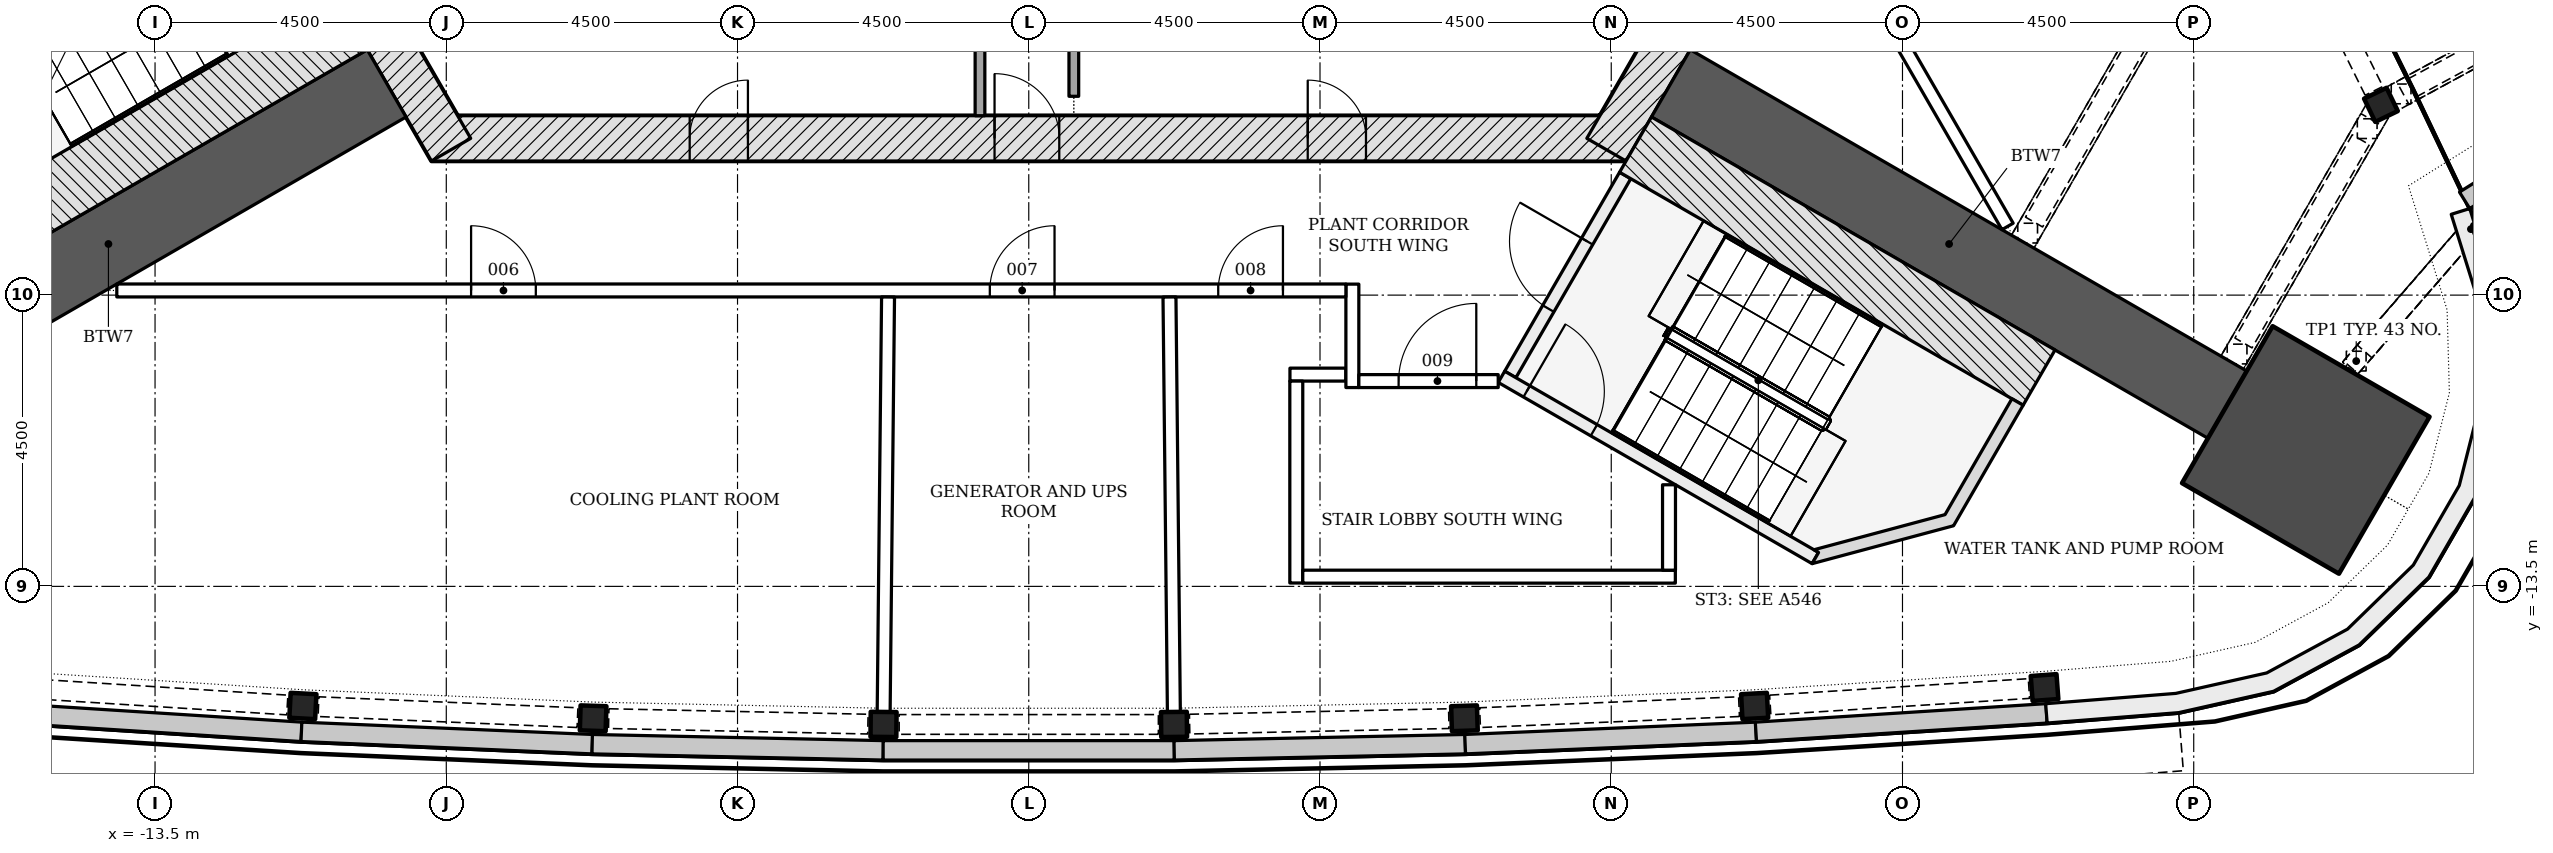
"""IFC4 building model, lengths in metres.
Left out: names, types, materials, properties, quantities, classifications, styles, units other than length and angle.
Written with IfcOpenShell. Run it as: python <this file> out.ifc"""

import sys

from ifc_helpers import new_model, si_unit, direction, frame, frame_2d, origin, origin_2d, place, context, subcontext, project, spatial, polyline, rectangle, i_section, outline, extrude, element, fill, save


model = new_model("IFC4")
c1 = context("Model", 3, precision=1e-05, world=origin(), true_north=direction((0.0, 1.0)))
c2 = subcontext(c1, "Body", "Model", "MODEL_VIEW")
j1 = project(units=[si_unit("LENGTHUNIT", "METRE"), si_unit("PLANEANGLEUNIT", "RADIAN")], contexts=[c1])
p1 = place(None, origin())
s1 = spatial("IfcSite", under=j1, at=p1, CompositionType="ELEMENT")
p2 = place(p1, origin())
s2 = spatial("IfcBuilding", under=s1, at=p2, CompositionType="ELEMENT")
p3 = place(p2, frame((0.0, 0.0, 168.9)))
s3 = spatial("IfcBuildingStorey", under=s2, at=p3, CompositionType="ELEMENT", Elevation=168.9)
p4 = place(p3, frame((-9.229, -6.578, -0.3), z_axis=(0.0, 0.0, 1.0), x_axis=(1.0, 0.0, 0.0)))
e1 = element("IfcWall", 1, at=p4, inside=s3, PredefinedType="SHEAR", context=c2, shape_type="SweptSolid", body=[
    extrude(rectangle(XDim=18.458, YDim=0.7, at=frame_2d((9.229, 0.0))), origin(), (0.0, 0.0, 1.0), 5.5),
])
p5 = place(p4, frame((8.7, 0.0, 0.3)))
e2 = element("IfcOpeningElement", 2, at=p5, cuts=e1, PredefinedType="OPENING", context=c2, shape_type="SweptSolid", body=[
    extrude(rectangle(XDim=1.0, YDim=2.1, at=frame_2d((0.5, 1.05))), frame((0.0, 0.36, 0.0), z_axis=(0.0, -1.0, 0.0), x_axis=(1.0, 0.0, 0.0)), (0.0, 0.0, 1.0), 0.72),
])
p6 = place(p4, frame((3.99, 0.0, 0.3)))
e3 = element("IfcOpeningElement", 3, at=p6, cuts=e1, PredefinedType="OPENING", context=c2, shape_type="SweptSolid", body=[
    extrude(rectangle(XDim=0.9, YDim=2.1, at=frame_2d((0.45, 1.05))), frame((0.0, 0.36, 0.0), z_axis=(0.0, -1.0, 0.0), x_axis=(1.0, 0.0, 0.0)), (0.0, 0.0, 1.0), 0.72),
])
p7 = place(p4, frame((13.539, 0.0, 0.3)))
e4 = element("IfcOpeningElement", 4, at=p7, cuts=e1, PredefinedType="OPENING", context=c2, shape_type="SweptSolid", body=[
    extrude(rectangle(XDim=0.9, YDim=2.1, at=frame_2d((0.45, 1.05))), frame((0.0, 0.36, 0.0), z_axis=(0.0, -1.0, 0.0), x_axis=(1.0, 0.0, 0.0)), (0.0, 0.0, 1.0), 0.72),
])
for number, where, z_axis, x_axis in (
    (5, (8.926, -6.753, -0.3), (0.0, 0.0, 1.0), (0.5, 0.866, 0.0)),
    (6, (-10.311, -4.353, -0.3), (0.0, 0.0, 1.0), (0.5, -0.866, 0.0)),
):
    element("IfcWall", number, at=place(p3, frame(where, z_axis=z_axis, x_axis=x_axis)), inside=s3, PredefinedType="SHEAR", context=c2, shape_type="SweptSolid", body=[
        extrude(rectangle(XDim=2.771, YDim=0.7, at=frame_2d((1.386, 0.0))), origin(), (0.0, 0.0, 1.0), 5.5),
    ])
for number, where, z_axis, x_axis in (
    (7, (-9.922, -5.728, -0.3), (0.0, 0.0, 1.0), (-0.866, -0.5, 0.0)),
    (8, (9.922, -5.728, -0.3), (0.0, 0.0, 1.0), (0.866, -0.5, 0.0)),
):
    element("IfcWall", number, at=place(p3, frame(where, z_axis=z_axis, x_axis=x_axis)), inside=s3, PredefinedType="SHEAR", context=c2, shape_type="SweptSolid", body=[
        extrude(rectangle(XDim=9.927, YDim=1.2, at=frame_2d((4.964, 0.0))), origin(), (0.0, 0.0, 1.0), 5.5),
    ])
p8 = place(p3, frame((19.731, -11.392, -0.3), z_axis=(0.0, 0.0, 1.0), x_axis=(0.866025403784, -0.5, 0.0)))
e9 = element("IfcColumn", 9, at=p8, inside=s3, PredefinedType="COLUMN", context=c2, shape_type="SweptSolid", body=[
    extrude(rectangle(XDim=2.8, YDim=2.8, at=origin_2d()), origin(), (0.0, 0.0, 1.0), 5.5),
])
for number, where, z_axis, x_axis in (
    (10, (-11.216, -15.348, -0.3), (0.0, 0.0, 1.0), (0.999, -0.053, 0.0)),
    (11, (-6.731, -15.538, -0.3), (0.0, 0.0, 1.0), (0.999, -0.032, 0.0)),
    (12, (-2.244, -15.633, -0.3), (0.0, 0.0, 1.0), (1.0, -0.011, 0.0)),
    (13, (2.244, -15.633, -0.3), (0.0, 0.0, 1.0), (1.0, 0.011, 0.0)),
    (14, (6.731, -15.538, -0.3), (0.0, 0.0, 1.0), (0.999, 0.032, 0.0)),
    (15, (11.216, -15.348, -0.3), (0.0, 0.0, 1.0), (0.999, 0.053, 0.0)),
    (16, (15.695, -15.063, -0.3), (0.0, 0.0, 1.0), (0.997, 0.074, 0.0)),
    (17, (20.893, -6.061, -0.3), (0.0, 0.0, 1.0), (-0.434, 0.901, 0.0)),
):
    element("IfcColumn", number, at=place(p3, frame(where, z_axis=z_axis, x_axis=x_axis)), inside=s3, PredefinedType="COLUMN", context=c2, shape_type="SweptSolid", body=[
        extrude(i_section(OverallWidth=0.399, OverallDepth=0.386, WebThickness=0.021, FlangeThickness=0.033, FilletRadius=0.015, at=origin_2d()), origin(), (0.0, 0.0, 1.0), 5.5),
    ])
p9 = place(p3, origin())
e18 = element("IfcWall", 18, at=p9, inside=s3, PredefinedType="NOTDEFINED", context=c2, shape_type="SweptSolid", body=[
    extrude(outline(polyline([(-15.736, -15.612), (-11.245, -15.897), (-11.226, -15.598), (-15.717, -15.312), (-15.736, -15.612)])), origin(), (0.0, 0.0, 1.0), 1.2),
])
p10 = place(p3, origin())
e19 = element("IfcWall", 19, at=p10, inside=s3, PredefinedType="NOTDEFINED", context=c2, shape_type="SweptSolid", body=[
    extrude(outline(polyline([(-11.245, -15.897), (-6.749, -16.088), (-6.736, -15.788), (-11.232, -15.598), (-11.245, -15.897)])), origin(), (0.0, 0.0, 1.0), 1.2),
])
p11 = place(p3, origin())
e20 = element("IfcWall", 20, at=p11, inside=s3, PredefinedType="NOTDEFINED", context=c2, shape_type="SweptSolid", body=[
    extrude(outline(polyline([(-6.749, -16.088), (-2.25, -16.183), (-2.244, -15.883), (-6.742, -15.788), (-6.749, -16.088)])), origin(), (0.0, 0.0, 1.0), 1.2),
])
p12 = place(p3, origin())
e21 = element("IfcWall", 21, at=p12, inside=s3, PredefinedType="NOTDEFINED", context=c2, shape_type="SweptSolid", body=[
    extrude(outline(polyline([(-2.25, -16.183), (2.25, -16.183), (2.25, -15.883), (-2.25, -15.883), (-2.25, -16.183)])), origin(), (0.0, 0.0, 1.0), 1.2),
])
p13 = place(p3, origin())
e22 = element("IfcWall", 22, at=p13, inside=s3, PredefinedType="NOTDEFINED", context=c2, shape_type="SweptSolid", body=[
    extrude(outline(polyline([(2.25, -16.183), (6.749, -16.088), (6.742, -15.788), (2.244, -15.883), (2.25, -16.183)])), origin(), (0.0, 0.0, 1.0), 1.2),
])
p14 = place(p3, origin())
e23 = element("IfcWall", 23, at=p14, inside=s3, PredefinedType="NOTDEFINED", context=c2, shape_type="SweptSolid", body=[
    extrude(outline(polyline([(6.749, -16.088), (11.245, -15.897), (11.232, -15.598), (6.736, -15.788), (6.749, -16.088)])), origin(), (0.0, 0.0, 1.0), 1.2),
])
p15 = place(p3, origin())
e24 = element("IfcWall", 24, at=p15, inside=s3, PredefinedType="NOTDEFINED", context=c2, shape_type="SweptSolid", body=[
    extrude(outline(polyline([(11.245, -15.897), (15.736, -15.612), (15.717, -15.312), (11.226, -15.598), (11.245, -15.897)])), origin(), (0.0, 0.0, 1.0), 1.2),
])
p16 = place(p3, origin())
e25 = element("IfcWall", 25, at=p16, inside=s3, PredefinedType="NOTDEFINED", context=c2, shape_type="SweptSolid", body=[
    extrude(outline(polyline([(22.265, -7.662), (24.846, -6.048), (24.687, -5.794), (22.106, -7.408), (22.265, -7.662)])), origin(), (0.0, 0.0, 1.0), 1.2),
])
p17 = place(p3, origin())
e26 = element("IfcWall", 26, at=p17, inside=s3, PredefinedType="NOTDEFINED", context=c2, shape_type="SweptSolid", body=[
    extrude(outline(polyline([(15.736, -15.612), (17.768, -15.451), (19.234, -15.121), (20.555, -14.405), (21.632, -13.357), (22.383, -12.055), (22.753, -10.599), (22.712, -9.097), (22.265, -7.662), (21.979, -7.751), (22.413, -9.146), (22.452, -10.565), (22.103, -11.941), (21.393, -13.171), (20.376, -14.161), (19.128, -14.837), (17.723, -15.154), (15.712, -15.312), (15.736, -15.612)])), origin(), (0.0, 0.0, 1.0), 5.2),
])
p18 = place(p3, frame((-0.754, 5.272, 0.0), z_axis=(0.0, 0.0, 1.0), x_axis=(0.0, -1.0, 0.0)))
e27 = element("IfcWall", 27, at=p18, inside=s3, PredefinedType="PARTITIONING", context=c2, shape_type="SweptSolid", body=[
    extrude(rectangle(XDim=11.5, YDim=0.15, at=frame_2d((5.75, 0.0))), origin(), (0.0, 0.0, 1.0), 5.2),
])
p19 = place(p18, frame((3.701, 0.0, 0.0)))
e28 = element("IfcOpeningElement", 28, at=p19, cuts=e27, PredefinedType="OPENING", context=c2, shape_type="SweptSolid", body=[
    extrude(rectangle(XDim=0.9, YDim=2.1, at=frame_2d((0.45, 1.05))), frame((0.0, 0.085, 0.0), z_axis=(0.0, -1.0, 0.0), x_axis=(1.0, 0.0, 0.0)), (0.0, 0.0, 1.0), 0.17),
])
p20 = place(p3, frame((0.696, -5.928, 0.0), z_axis=(0.0, 0.0, 1.0), x_axis=(0.0, 1.0, 0.0)))
e29 = element("IfcWall", 29, at=p20, inside=s3, PredefinedType="PARTITIONING", context=c2, shape_type="SweptSolid", body=[
    extrude(rectangle(XDim=11.549, YDim=0.15, at=frame_2d((5.774, 0.0))), origin(), (0.0, 0.0, 1.0), 5.2),
])
p21 = place(p20, frame((6.6, 0.0, 0.0)))
e30 = element("IfcOpeningElement", 30, at=p21, cuts=e29, PredefinedType="OPENING", context=c2, shape_type="SweptSolid", body=[
    extrude(rectangle(XDim=0.9, YDim=2.1, at=frame_2d((0.45, 1.05))), frame((0.0, 0.085, 0.0), z_axis=(0.0, -1.0, 0.0), x_axis=(1.0, 0.0, 0.0)), (0.0, 0.0, 1.0), 0.17),
])
p22 = place(p3, frame((-10.468, -4.782, -0.3), z_axis=(0.0, 0.0, 1.0), x_axis=(-0.866018442252, -0.500012057535, 0.0)))
e31 = element("IfcWall", 31, at=p22, inside=s3, PredefinedType="SHEAR", context=c2, shape_type="SweptSolid", body=[
    extrude(rectangle(XDim=7.2, YDim=0.986, at=frame_2d((3.6, 0.0))), origin(), (0.0, 0.0, 1.0), 5.5),
])
p23 = place(p3, frame((7.44, -10.226, -0.3), z_axis=(0.0, 0.0, 1.0), x_axis=(0.500022077904, 0.866012656725, 0.0)))
e32 = element("IfcWall", 32, at=p23, inside=s3, PredefinedType="SHEAR", context=c2, shape_type="SweptSolid", body=[
    extrude(rectangle(XDim=3.55, YDim=0.2, at=frame_2d((1.775, 0.0))), origin(), (0.0, 0.0, 1.0), 5.5),
])
p24 = place(p23, frame((1.175, 0.0, 0.3)))
e33 = element("IfcOpeningElement", 33, at=p24, cuts=e32, PredefinedType="OPENING", context=c2, shape_type="SweptSolid", body=[
    extrude(rectangle(XDim=1.2, YDim=2.1, at=frame_2d((0.6, 1.05))), frame((0.0, 0.11, 0.0), z_axis=(0.0, -1.0, 0.0), x_axis=(1.0, 0.0, 0.0)), (0.0, 0.0, 1.0), 0.22),
])
p25 = place(p3, frame((7.304, -10.262, -0.3), z_axis=(0.0, 0.0, 1.0), x_axis=(0.866026594901, -0.49999793692, 0.0)))
e34 = element("IfcWall", 34, at=p25, inside=s3, PredefinedType="SHEAR", context=c2, shape_type="SweptSolid", body=[
    extrude(rectangle(XDim=5.6, YDim=0.2, at=frame_2d((2.8, 0.0))), origin(), (0.0, 0.0, 1.0), 5.5),
])
p26 = place(p25, frame((0.45, 0.0, 0.3)))
e35 = element("IfcOpeningElement", 35, at=p26, cuts=e34, PredefinedType="OPENING", context=c2, shape_type="SweptSolid", body=[
    extrude(rectangle(XDim=1.2, YDim=2.1, at=frame_2d((0.6, 1.05))), frame((0.0, 0.11, 0.0), z_axis=(0.0, -1.0, 0.0), x_axis=(1.0, 0.0, 0.0)), (0.0, 0.0, 1.0), 0.22),
])
p27 = place(p3, frame((9.375, -6.675, -0.3), z_axis=(0.0, 0.0, 1.0), x_axis=(0.866026919366, -0.499997374926, 0.0)))
e36 = element("IfcWall", 36, at=p27, inside=s3, PredefinedType="SHEAR", context=c2, shape_type="SweptSolid", body=[
    extrude(rectangle(XDim=7.2, YDim=0.986, at=frame_2d((3.6, 0.0))), origin(), (0.0, 0.0, 1.0), 5.5),
])
p28 = place(p3, frame((0.0, 0.0, -0.3)))
e37 = element("IfcWall", 37, at=p28, inside=s3, PredefinedType="SHEAR", context=c2, shape_type="SweptSolid", body=[
    extrude(outline(polyline([(12.104, -13.149), (14.289, -12.563), (15.364, -10.701), (15.191, -10.601), (14.157, -12.392), (12.132, -12.934), (12.204, -12.976), (12.204, -12.976), (12.204, -12.976), (12.204, -12.976), (12.204, -12.976), (12.204, -12.976), (12.204, -12.976), (12.204, -12.976), (12.204, -12.976), (12.204, -12.976), (12.204, -12.976), (12.204, -12.976), (12.204, -12.976), (12.204, -12.976), (12.204, -12.976), (12.204, -12.976), (12.204, -12.976), (12.104, -13.149)])), origin(), (0.0, 0.0, 1.0), 5.5),
])
p29 = place(p3, frame((4.036, -10.228, 0.0), z_axis=(0.0, 0.0, 1.0), x_axis=(1.0, 0.0, 0.0)))
e38 = element("IfcWall", 38, at=p29, inside=s3, PredefinedType="PARTITIONING", context=c2, shape_type="SweptSolid", body=[
    extrude(rectangle(XDim=0.864, YDim=0.2, at=frame_2d((0.432, 0.0))), origin(), (0.0, 0.0, 1.0), 5.2),
])
p30 = place(p3, frame((5.0, -10.428, 0.0), z_axis=(0.0, 0.0, 1.0), x_axis=(0.0, 1.0, 0.0)))
e39 = element("IfcWall", 39, at=p30, inside=s3, PredefinedType="PARTITIONING", context=c2, shape_type="SweptSolid", body=[
    extrude(rectangle(XDim=1.598, YDim=0.2, at=frame_2d((0.799, 0.0))), origin(), (0.0, 0.0, 1.0), 5.2),
])
p31 = place(p3, frame((5.1, -10.328, 0.0), z_axis=(0.0, 0.0, 1.0), x_axis=(1.0, 0.0, 0.0)))
e40 = element("IfcWall", 40, at=p31, inside=s3, PredefinedType="PARTITIONING", context=c2, shape_type="SweptSolid", body=[
    extrude(rectangle(XDim=2.154, YDim=0.2, at=frame_2d((1.077, 0.0))), origin(), (0.0, 0.0, 1.0), 4.647),
])
p32 = place(p31, frame((0.615, 0.0, 0.0)))
e41 = element("IfcOpeningElement", 41, at=p32, cuts=e40, PredefinedType="OPENING", context=c2, shape_type="SweptSolid", body=[
    extrude(rectangle(XDim=1.2, YDim=2.1, at=frame_2d((0.6, 1.05))), frame((0.0, 0.11, 0.0), z_axis=(0.0, -1.0, 0.0), x_axis=(1.0, 0.0, 0.0)), (0.0, 0.0, 1.0), 0.22),
])
p33 = place(p3, frame((-14.091, -8.928, 0.0), z_axis=(0.0, 0.0, 1.0), x_axis=(1.0, 0.0, 0.0)))
e42 = element("IfcWall", 42, at=p33, inside=s3, PredefinedType="PARTITIONING", context=c2, shape_type="SweptSolid", body=[
    extrude(rectangle(XDim=18.991, YDim=0.2, at=frame_2d((9.495, 0.0))), origin(), (0.0, 0.0, 1.0), 4.647),
])
p34 = place(p33, frame((5.474, 0.0, 0.0)))
e43 = element("IfcOpeningElement", 43, at=p34, cuts=e42, PredefinedType="OPENING", context=c2, shape_type="SweptSolid", body=[
    extrude(rectangle(XDim=1.0, YDim=2.1, at=frame_2d((0.5, 1.05))), frame((0.0, 0.11, 0.0), z_axis=(0.0, -1.0, 0.0), x_axis=(1.0, 0.0, 0.0)), (0.0, 0.0, 1.0), 0.22),
])
p35 = place(p33, frame((13.489, 0.0, 0.0)))
e44 = element("IfcOpeningElement", 44, at=p35, cuts=e42, PredefinedType="OPENING", context=c2, shape_type="SweptSolid", body=[
    extrude(rectangle(XDim=1.0, YDim=2.1, at=frame_2d((0.5, 1.05))), frame((0.0, 0.11, 0.0), z_axis=(0.0, -1.0, 0.0), x_axis=(1.0, 0.0, 0.0)), (0.0, 0.0, 1.0), 0.22),
])
p36 = place(p33, frame((17.018, 0.0, 0.0)))
e45 = element("IfcOpeningElement", 45, at=p36, cuts=e42, PredefinedType="OPENING", context=c2, shape_type="SweptSolid", body=[
    extrude(rectangle(XDim=1.0, YDim=2.1, at=frame_2d((0.5, 1.05))), frame((0.0, 0.11, 0.0), z_axis=(0.0, -1.0, 0.0), x_axis=(1.0, 0.0, 0.0)), (0.0, 0.0, 1.0), 0.22),
])
p37 = place(p3, frame((-2.242, -15.483, 0.0), z_axis=(0.0, 0.0, 1.0), x_axis=(0.010553202581, 0.999944313407, 0.0)))
e46 = element("IfcWall", 46, at=p37, inside=s3, PredefinedType="PARTITIONING", context=c2, shape_type="SweptSolid", body=[
    extrude(rectangle(XDim=6.454, YDim=0.2, at=frame_2d((3.227, 0.0))), origin(), (0.0, 0.0, 1.0), 4.647),
])
p38 = place(p3, frame((2.174, -9.029, 0.0), z_axis=(0.0, 0.0, 1.0), x_axis=(0.01055360175, -0.999944309194, 0.0)))
e47 = element("IfcWall", 47, at=p38, inside=s3, PredefinedType="PARTITIONING", context=c2, shape_type="SweptSolid", body=[
    extrude(rectangle(XDim=6.454, YDim=0.2, at=frame_2d((3.227, 0.0))), origin(), (0.0, 0.0, 1.0), 4.647),
])
p39 = place(p3, frame((4.134, -10.328, 0.0), z_axis=(0.0, 0.0, 1.0), x_axis=(0.0, -1.0, 0.0)))
e48 = element("IfcWall", 48, at=p39, inside=s3, PredefinedType="PARTITIONING", context=c2, shape_type="SweptSolid", body=[
    extrude(rectangle(XDim=3.12, YDim=0.2, at=frame_2d((1.56, 0.0))), origin(), (0.0, 0.0, 1.0), 5.2),
])
p40 = place(p3, frame((4.234, -13.35, 0.0), z_axis=(0.0, 0.0, 1.0), x_axis=(1.0, 0.0, 0.0)))
e49 = element("IfcWall", 49, at=p40, inside=s3, PredefinedType="PARTITIONING", context=c2, shape_type="SweptSolid", body=[
    extrude(rectangle(XDim=5.757, YDim=0.2, at=frame_2d((2.878, 0.0))), origin(), (0.0, 0.0, 1.0), 4.647),
])
p41 = place(p3, frame((9.893, -13.25, 0.0), z_axis=(0.0, 0.0, 1.0), x_axis=(0.0, 1.0, 0.0)))
e50 = element("IfcWall", 50, at=p41, inside=s3, PredefinedType="PARTITIONING", context=c2, shape_type="SweptSolid", body=[
    extrude(rectangle(XDim=1.32, YDim=0.2, at=frame_2d((0.66, 0.0))), origin(), (0.0, 0.0, 1.0), 5.2),
])
p42 = place(p3, frame((5.455, 8.808, 0.0), z_axis=(0.0, 0.0, 1.0), x_axis=(0.49999276215, -0.866029582519, 0.0)))
e51 = element("IfcWall", 51, at=p42, inside=s3, PredefinedType="PARTITIONING", context=c2, shape_type="SweptSolid", body=[
    extrude(rectangle(XDim=19.337, YDim=0.2, at=frame_2d((9.668, 0.0))), origin(), (0.0, 0.0, 1.0), 5.2),
])
p43 = place(p42, frame((8.556, 0.0, 0.0)))
e52 = element("IfcOpeningElement", 52, at=p43, cuts=e51, PredefinedType="OPENING", context=c2, shape_type="SweptSolid", body=[
    extrude(rectangle(XDim=1.0, YDim=2.1, at=frame_2d((0.5, 1.05))), frame((0.0, 0.11, 0.0), z_axis=(0.0, -1.0, 0.0), x_axis=(1.0, 0.0, 0.0)), (0.0, 0.0, 1.0), 0.22),
])
p44 = place(p5, origin())
e53 = element("IfcDoor", 53, at=p44, inside=s3, OperationType="SINGLE_SWING_LEFT", PredefinedType="DOOR", context=c2, shape_type="SweptSolid", body=[
    extrude(rectangle(XDim=1.0, YDim=2.1, at=frame_2d((0.5, 1.05))), frame((0.0, 0.075, 0.0), z_axis=(0.0, -1.0, 0.0), x_axis=(1.0, 0.0, 0.0)), (0.0, 0.0, 1.0), 0.15),
])
fill(e2, e53)
p45 = place(p6, origin())
e54 = element("IfcDoor", 54, at=p45, inside=s3, OperationType="SINGLE_SWING_RIGHT", PredefinedType="DOOR", context=c2, shape_type="SweptSolid", body=[
    extrude(rectangle(XDim=0.9, YDim=2.1, at=frame_2d((0.45, 1.05))), frame((0.0, 0.075, 0.0), z_axis=(0.0, -1.0, 0.0), x_axis=(1.0, 0.0, 0.0)), (0.0, 0.0, 1.0), 0.15),
])
fill(e3, e54)
p46 = place(p7, origin())
e55 = element("IfcDoor", 55, at=p46, inside=s3, OperationType="SINGLE_SWING_LEFT", PredefinedType="DOOR", context=c2, shape_type="SweptSolid", body=[
    extrude(rectangle(XDim=0.9, YDim=2.1, at=frame_2d((0.45, 1.05))), frame((0.0, 0.075, 0.0), z_axis=(0.0, -1.0, 0.0), x_axis=(1.0, 0.0, 0.0)), (0.0, 0.0, 1.0), 0.15),
])
fill(e4, e55)
p47 = place(p24, origin())
e56 = element("IfcDoor", 56, at=p47, inside=s3, OperationType="SINGLE_SWING_RIGHT", PredefinedType="DOOR", context=c2, shape_type="SweptSolid", body=[
    extrude(rectangle(XDim=1.2, YDim=2.1, at=frame_2d((0.6, 1.05))), frame((0.0, 0.025, 0.0), z_axis=(0.0, -1.0, 0.0), x_axis=(1.0, 0.0, 0.0)), (0.0, 0.0, 1.0), 0.05),
])
fill(e33, e56)
p48 = place(p26, origin())
e57 = element("IfcDoor", 57, at=p48, inside=s3, OperationType="SINGLE_SWING_LEFT", PredefinedType="DOOR", context=c2, shape_type="SweptSolid", body=[
    extrude(rectangle(XDim=1.2, YDim=2.1, at=frame_2d((0.6, 1.05))), frame((0.0, 0.025, 0.0), z_axis=(0.0, -1.0, 0.0), x_axis=(1.0, 0.0, 0.0)), (0.0, 0.0, 1.0), 0.05),
])
fill(e35, e57)
p49 = place(p34, origin())
e58 = element("IfcDoor", 58, at=p49, inside=s3, OperationType="SINGLE_SWING_LEFT", PredefinedType="DOOR", context=c2, shape_type="SweptSolid", body=[
    extrude(rectangle(XDim=1.0, YDim=2.1, at=frame_2d((0.5, 1.05))), frame((0.0, 0.025, 0.0), z_axis=(0.0, -1.0, 0.0), x_axis=(1.0, 0.0, 0.0)), (0.0, 0.0, 1.0), 0.05),
])
fill(e43, e58)
p50 = place(p35, origin())
e59 = element("IfcDoor", 59, at=p50, inside=s3, OperationType="SINGLE_SWING_RIGHT", PredefinedType="DOOR", context=c2, shape_type="SweptSolid", body=[
    extrude(rectangle(XDim=1.0, YDim=2.1, at=frame_2d((0.5, 1.05))), frame((0.0, 0.025, 0.0), z_axis=(0.0, -1.0, 0.0), x_axis=(1.0, 0.0, 0.0)), (0.0, 0.0, 1.0), 0.05),
])
fill(e44, e59)
p51 = place(p36, origin())
e60 = element("IfcDoor", 60, at=p51, inside=s3, OperationType="SINGLE_SWING_RIGHT", PredefinedType="DOOR", context=c2, shape_type="SweptSolid", body=[
    extrude(rectangle(XDim=1.0, YDim=2.1, at=frame_2d((0.5, 1.05))), frame((0.0, 0.025, 0.0), z_axis=(0.0, -1.0, 0.0), x_axis=(1.0, 0.0, 0.0)), (0.0, 0.0, 1.0), 0.05),
])
fill(e45, e60)
p52 = place(p32, origin())
e61 = element("IfcDoor", 61, at=p52, inside=s3, OperationType="SINGLE_SWING_RIGHT", PredefinedType="DOOR", context=c2, shape_type="SweptSolid", body=[
    extrude(rectangle(XDim=1.2, YDim=2.1, at=frame_2d((0.6, 1.05))), frame((0.0, 0.025, 0.0), z_axis=(0.0, -1.0, 0.0), x_axis=(1.0, 0.0, 0.0)), (0.0, 0.0, 1.0), 0.05),
])
fill(e41, e61)
save(model, sys.argv[1])
